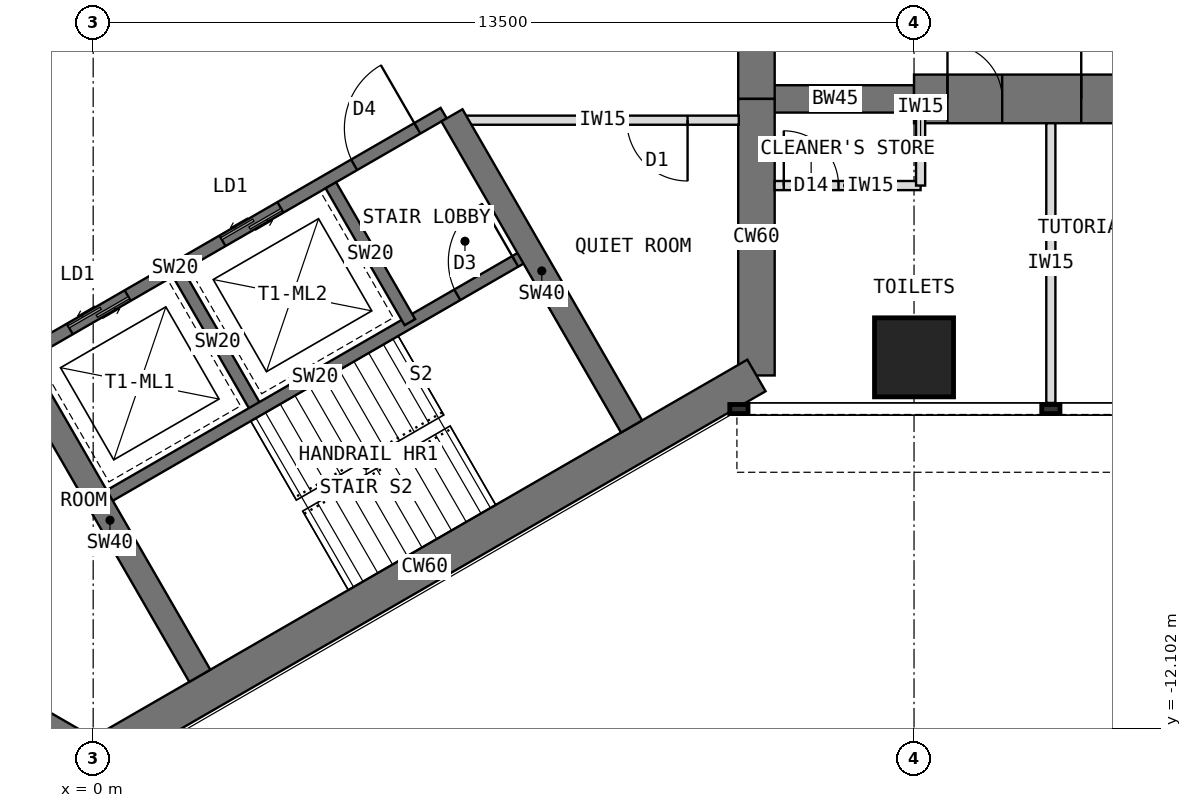
"""IFC4 building model, lengths in metres.
Left out: names, types, materials, properties, quantities, classifications, styles, units other than length and angle.
Written with IfcOpenShell. Run it as: python <this file> out.ifc"""

import sys

from ifc_helpers import new_model, si_unit, direction, frame, frame_2d, origin, origin_2d, place, context, subcontext, project, spatial, rectangle, extrude, element, fill, save


model = new_model("IFC4")
c1 = context("Model", 3, precision=1e-05, world=origin(), true_north=direction((0.0, 1.0)))
c2 = subcontext(c1, "Body", "Model", "MODEL_VIEW")
j1 = project(units=[si_unit("LENGTHUNIT", "METRE"), si_unit("PLANEANGLEUNIT", "RADIAN")], contexts=[c1])
p1 = place(None, origin())
s1 = spatial("IfcSite", under=j1, at=p1, CompositionType="ELEMENT")
p2 = place(p1, origin())
s2 = spatial("IfcBuilding", under=s1, at=p2, CompositionType="ELEMENT")
p3 = place(p2, frame((0.0, 0.0, 133.5)))
s3 = spatial("IfcBuildingStorey", under=s2, at=p3, CompositionType="ELEMENT", Elevation=133.5)
p4 = place(p3, frame((10.908, -6.298, 0.0), z_axis=(0.0, 0.0, 1.0), x_axis=(0.0, 1.0, 0.0)))
e1 = element("IfcWall", 1, at=p4, inside=s3, PredefinedType="SHEAR", context=c2, shape_type="SweptSolid", body=[
    extrude(rectangle(XDim=4.548, YDim=0.6, at=frame_2d((2.274, 0.0))), origin(), (0.0, 0.0, 1.0), 4.0),
])
p5 = place(p3, frame((10.908, -1.75, 0.0), z_axis=(0.0, 0.0, 1.0), x_axis=(0.0, 1.0, 0.0)))
e2 = element("IfcWall", 2, at=p5, inside=s3, PredefinedType="SHEAR", context=c2, shape_type="SweptSolid", body=[
    extrude(rectangle(XDim=3.5, YDim=0.6, at=frame_2d((1.75, 0.0))), origin(), (0.0, 0.0, 1.0), 4.0),
])
p6 = place(p5, frame((0.85, 0.0, 0.0)))
e3 = element("IfcOpeningElement", 3, at=p6, cuts=e2, PredefinedType="OPENING", context=c2, shape_type="SweptSolid", body=[
    extrude(rectangle(XDim=1.8, YDim=2.1, at=frame_2d((0.9, 1.05))), frame((0.0, 0.31, 0.0), z_axis=(0.0, -1.0, 0.0), x_axis=(1.0, 0.0, 0.0)), (0.0, 0.0, 1.0), 0.62),
])
p7 = place(p3, frame((-3.939, -10.322, 0.0), z_axis=(0.0, 0.0, 1.0), x_axis=(0.866011268655, -0.500024481964, 0.0)))
e4 = element("IfcWall", 4, at=p7, inside=s3, PredefinedType="SHEAR", context=c2, shape_type="SweptSolid", body=[
    extrude(rectangle(XDim=4.548, YDim=0.6, at=frame_2d((2.274, 0.0))), origin(), (0.0, 0.0, 1.0), 4.0),
])
p8 = place(p3, frame((0.0, -12.596, 0.0), z_axis=(0.0, 0.0, 1.0), x_axis=(0.866021940709, 0.500005998175, 0.0)))
e5 = element("IfcWall", 5, at=p8, inside=s3, PredefinedType="SHEAR", context=c2, shape_type="SweptSolid", body=[
    extrude(rectangle(XDim=12.596, YDim=0.6, at=frame_2d((6.298, 0.0))), origin(), (0.0, 0.0, 1.0), 4.0),
])
p9 = place(p3, frame((10.908, -1.75, 0.0), z_axis=(0.0, 0.0, 1.0), x_axis=(1.0, 0.0, 0.0)))
e6 = element("IfcWall", 6, at=p9, inside=s3, PredefinedType="SHEAR", context=c2, shape_type="SweptSolid", body=[
    extrude(rectangle(XDim=2.592, YDim=0.45, at=frame_2d((1.296, 0.0))), origin(), (0.0, 0.0, 1.0), 4.0),
])
p10 = place(p3, frame((13.5, -1.75, 0.0), z_axis=(0.0, 0.0, 1.0), x_axis=(1.0, 0.0, 0.0)))
e7 = element("IfcWall", 7, at=p10, inside=s3, PredefinedType="SHEAR", context=c2, shape_type="SweptSolid", body=[
    extrude(rectangle(XDim=13.2, YDim=0.8, at=frame_2d((6.6, 0.0))), origin(), (0.0, 0.0, 1.0), 4.0),
])
p11 = place(p10, frame((0.55, 0.0, 0.0)))
e8 = element("IfcOpeningElement", 8, at=p11, cuts=e7, PredefinedType="OPENING", context=c2, shape_type="SweptSolid", body=[
    extrude(rectangle(XDim=0.9, YDim=2.1, at=frame_2d((0.45, 1.05))), frame((0.0, 0.41, 0.0), z_axis=(0.0, -1.0, 0.0), x_axis=(1.0, 0.0, 0.0)), (0.0, 0.0, 1.0), 0.82),
])
p12 = place(p10, frame((2.75, 0.0, 0.0)))
e9 = element("IfcOpeningElement", 9, at=p12, cuts=e7, PredefinedType="OPENING", context=c2, shape_type="SweptSolid", body=[
    extrude(rectangle(XDim=1.0, YDim=2.1, at=frame_2d((0.5, 1.05))), frame((0.0, 0.41, 0.0), z_axis=(0.0, -1.0, 0.0), x_axis=(1.0, 0.0, 0.0)), (0.0, 0.0, 1.0), 0.82),
])
p13 = place(p10, frame((7.25, 0.0, 0.0)))
e10 = element("IfcOpeningElement", 10, at=p13, cuts=e7, PredefinedType="OPENING", context=c2, shape_type="SweptSolid", body=[
    extrude(rectangle(XDim=1.0, YDim=2.1, at=frame_2d((0.5, 1.05))), frame((0.0, 0.41, 0.0), z_axis=(0.0, -1.0, 0.0), x_axis=(1.0, 0.0, 0.0)), (0.0, 0.0, 1.0), 0.82),
])
p14 = place(p3, frame((13.5, -6.0, 0.0), z_axis=(0.0, 0.0, 1.0), x_axis=(1.0, 0.0, 0.0)))
e11 = element("IfcColumn", 11, at=p14, inside=s3, PredefinedType="COLUMN", context=c2, shape_type="SweptSolid", body=[
    extrude(rectangle(XDim=1.3, YDim=1.3, at=origin_2d()), origin(), (0.0, 0.0, 1.0), 4.0),
])
p15 = place(p3, frame((-1.164, -5.984, 0.0), z_axis=(0.0, 0.0, 1.0), x_axis=(0.866026010844, 0.49999894854, 0.0)))
e12 = element("IfcWall", 12, at=p15, inside=s3, PredefinedType="SHEAR", context=c2, shape_type="SweptSolid", body=[
    extrude(rectangle(XDim=8.0, YDim=0.2, at=frame_2d((4.0, 0.0))), origin(), (0.0, 0.0, 1.0), 4.0),
])
p16 = place(p15, frame((6.3, 0.0, 0.0)))
e13 = element("IfcOpeningElement", 13, at=p16, cuts=e12, PredefinedType="OPENING", context=c2, shape_type="SweptSolid", body=[
    extrude(rectangle(XDim=1.2, YDim=2.1, at=frame_2d((0.6, 1.05))), frame((0.0, 0.11, 0.0), z_axis=(0.0, -1.0, 0.0), x_axis=(1.0, 0.0, 0.0)), (0.0, 0.0, 1.0), 0.22),
])
p17 = place(p15, frame((0.9, 0.0, 0.0)))
e14 = element("IfcOpeningElement", 14, at=p17, cuts=e12, PredefinedType="OPENING", context=c2, shape_type="SweptSolid", body=[
    extrude(rectangle(XDim=1.1, YDim=2.2, at=frame_2d((0.55, 1.1))), frame((0.0, 0.11, 0.0), z_axis=(0.0, -1.0, 0.0), x_axis=(1.0, 0.0, 0.0)), (0.0, 0.0, 1.0), 0.22),
])
p18 = place(p15, frame((3.8, 0.0, 0.0)))
e15 = element("IfcOpeningElement", 15, at=p18, cuts=e12, PredefinedType="OPENING", context=c2, shape_type="SweptSolid", body=[
    extrude(rectangle(XDim=1.1, YDim=2.2, at=frame_2d((0.55, 1.1))), frame((0.0, 0.11, 0.0), z_axis=(0.0, -1.0, 0.0), x_axis=(1.0, 0.0, 0.0)), (0.0, 0.0, 1.0), 0.22),
])
p19 = place(p3, frame((1.397, -4.62, 0.0), z_axis=(0.0, 0.0, 1.0), x_axis=(0.499936506574, -0.866062058628, 0.0)))
e16 = element("IfcWall", 16, at=p19, inside=s3, PredefinedType="SHEAR", context=c2, shape_type="SweptSolid", body=[
    extrude(rectangle(XDim=2.6, YDim=0.2, at=frame_2d((1.3, 0.0))), origin(), (0.0, 0.0, 1.0), 4.0),
])
p20 = place(p3, frame((3.909, -3.17, 0.0), z_axis=(0.0, 0.0, 1.0), x_axis=(0.49997716683, -0.86603858612, 0.0)))
e17 = element("IfcWall", 17, at=p20, inside=s3, PredefinedType="SHEAR", context=c2, shape_type="SweptSolid", body=[
    extrude(rectangle(XDim=2.6, YDim=0.2, at=frame_2d((1.3, 0.0))), origin(), (0.0, 0.0, 1.0), 4.0),
])
p21 = place(p3, frame((0.186, -8.322, 0.0), z_axis=(0.0, 0.0, 1.0), x_axis=(0.866026010844, 0.49999894854, 0.0)))
e18 = element("IfcWall", 18, at=p21, inside=s3, PredefinedType="SHEAR", context=c2, shape_type="SweptSolid", body=[
    extrude(rectangle(XDim=8.0, YDim=0.2, at=frame_2d((4.0, 0.0))), origin(), (0.0, 0.0, 1.0), 4.0),
])
p22 = place(p21, frame((6.7, 0.0, 0.0)))
e19 = element("IfcOpeningElement", 19, at=p22, cuts=e18, PredefinedType="OPENING", context=c2, shape_type="SweptSolid", body=[
    extrude(rectangle(XDim=1.1, YDim=2.1, at=frame_2d((0.55, 1.05))), frame((0.0, 0.11, 0.0), z_axis=(0.0, -1.0, 0.0), x_axis=(1.0, 0.0, 0.0)), (0.0, 0.0, 1.0), 0.22),
])
p23 = place(p3, frame((5.901, -2.02, 0.0), z_axis=(0.0, 0.0, 1.0), x_axis=(0.500027676417, -0.866009424208, 0.0)))
e20 = element("IfcWall", 20, at=p23, inside=s3, PredefinedType="SHEAR", context=c2, shape_type="SweptSolid", body=[
    extrude(rectangle(XDim=5.908, YDim=0.4, at=frame_2d((2.954, 0.0))), origin(), (0.0, 0.0, 1.0), 4.0),
])
p24 = place(p3, frame((-1.201, -6.12, 0.0), z_axis=(0.0, 0.0, 1.0), x_axis=(0.49999668571, -0.866027317282, 0.0)))
e21 = element("IfcWall", 21, at=p24, inside=s3, PredefinedType="SHEAR", context=c2, shape_type="SweptSolid", body=[
    extrude(rectangle(XDim=5.908, YDim=0.4, at=frame_2d((2.954, 0.0))), origin(), (0.0, 0.0, 1.0), 4.0),
])
p25 = place(p3, frame((15.75, -2.15, 0.0), z_axis=(0.0, 0.0, 1.0), x_axis=(0.0, -1.0, 0.0)))
e22 = element("IfcWall", 22, at=p25, inside=s3, PredefinedType="PARTITIONING", context=c2, shape_type="SweptSolid", body=[
    extrude(rectangle(XDim=4.6, YDim=0.15, at=frame_2d((2.3, 0.0))), origin(), (0.0, 0.0, 1.0), 3.8),
])
p26 = place(p3, frame((11.208, -3.175, 0.0), z_axis=(0.0, 0.0, 1.0), x_axis=(1.0, 0.0, 0.0)))
e23 = element("IfcWall", 23, at=p26, inside=s3, PredefinedType="PARTITIONING", context=c2, shape_type="SweptSolid", body=[
    extrude(rectangle(XDim=2.4, YDim=0.15, at=frame_2d((1.2, 0.0))), origin(), (0.0, 0.0, 1.0), 3.8),
])
p27 = place(p26, frame((0.15, 0.0, 0.0)))
e24 = element("IfcOpeningElement", 24, at=p27, cuts=e23, PredefinedType="OPENING", context=c2, shape_type="SweptSolid", body=[
    extrude(rectangle(XDim=0.9, YDim=2.1, at=frame_2d((0.45, 1.05))), frame((0.0, 0.085, 0.0), z_axis=(0.0, -1.0, 0.0), x_axis=(1.0, 0.0, 0.0)), (0.0, 0.0, 1.0), 0.17),
])
p28 = place(p3, frame((13.608, -1.975, 0.0), z_axis=(0.0, 0.0, 1.0), x_axis=(0.0, -1.0, 0.0)))
e25 = element("IfcWall", 25, at=p28, inside=s3, PredefinedType="PARTITIONING", context=c2, shape_type="SweptSolid", body=[
    extrude(rectangle(XDim=1.2, YDim=0.15, at=frame_2d((0.6, 0.0))), origin(), (0.0, 0.0, 1.0), 3.8),
])
p29 = place(p3, frame((10.618, -2.1, 0.0), z_axis=(0.0, 0.0, 1.0), x_axis=(-1.0, 0.0, 0.0)))
e26 = element("IfcWall", 26, at=p29, inside=s3, PredefinedType="PARTITIONING", context=c2, shape_type="SweptSolid", body=[
    extrude(rectangle(XDim=4.476, YDim=0.15, at=frame_2d((2.238, 0.0))), origin(), (0.0, 0.0, 1.0), 3.8),
])
p30 = place(p29, frame((0.843, 0.0, 0.0)))
e27 = element("IfcOpeningElement", 27, at=p30, cuts=e26, PredefinedType="OPENING", context=c2, shape_type="SweptSolid", body=[
    extrude(rectangle(XDim=1.0, YDim=2.1, at=frame_2d((0.5, 1.05))), frame((0.0, 0.085, 0.0), z_axis=(0.0, -1.0, 0.0), x_axis=(1.0, 0.0, 0.0)), (0.0, 0.0, 1.0), 0.17),
])
p31 = place(p16, origin())
e28 = element("IfcDoor", 28, at=p31, inside=s3, OperationType="SINGLE_SWING_RIGHT", PredefinedType="DOOR", context=c2, shape_type="SweptSolid", body=[
    extrude(rectangle(XDim=1.2, YDim=2.1, at=frame_2d((0.6, 1.05))), frame((0.0, 0.025, 0.0), z_axis=(0.0, -1.0, 0.0), x_axis=(1.0, 0.0, 0.0)), (0.0, 0.0, 1.0), 0.05),
])
fill(e13, e28)
p32 = place(p17, origin())
e29 = element("IfcDoor", 29, at=p32, inside=s3, OperationType="DOUBLE_DOOR_SLIDING", PredefinedType="DOOR", context=c2, shape_type="SweptSolid", body=[
    extrude(rectangle(XDim=1.1, YDim=2.2, at=frame_2d((0.55, 1.1))), frame((0.0, 0.025, 0.0), z_axis=(0.0, -1.0, 0.0), x_axis=(1.0, 0.0, 0.0)), (0.0, 0.0, 1.0), 0.05),
])
fill(e14, e29)
p33 = place(p18, origin())
e30 = element("IfcDoor", 30, at=p33, inside=s3, OperationType="DOUBLE_DOOR_SLIDING", PredefinedType="DOOR", context=c2, shape_type="SweptSolid", body=[
    extrude(rectangle(XDim=1.1, YDim=2.2, at=frame_2d((0.55, 1.1))), frame((0.0, 0.025, 0.0), z_axis=(0.0, -1.0, 0.0), x_axis=(1.0, 0.0, 0.0)), (0.0, 0.0, 1.0), 0.05),
])
fill(e15, e30)
p34 = place(p22, origin())
e31 = element("IfcDoor", 31, at=p34, inside=s3, OperationType="SINGLE_SWING_RIGHT", PredefinedType="DOOR", context=c2, shape_type="SweptSolid", body=[
    extrude(rectangle(XDim=1.1, YDim=2.1, at=frame_2d((0.55, 1.05))), frame((0.0, 0.025, 0.0), z_axis=(0.0, -1.0, 0.0), x_axis=(1.0, 0.0, 0.0)), (0.0, 0.0, 1.0), 0.05),
])
fill(e19, e31)
p35 = place(p27, origin())
e32 = element("IfcDoor", 32, at=p35, inside=s3, OperationType="SINGLE_SWING_LEFT", PredefinedType="DOOR", context=c2, shape_type="SweptSolid", body=[
    extrude(rectangle(XDim=0.9, YDim=2.1, at=frame_2d((0.45, 1.05))), frame((0.0, 0.025, 0.0), z_axis=(0.0, -1.0, 0.0), x_axis=(1.0, 0.0, 0.0)), (0.0, 0.0, 1.0), 0.05),
])
fill(e24, e32)
p36 = place(p30, origin())
e33 = element("IfcDoor", 33, at=p36, inside=s3, OperationType="SINGLE_SWING_LEFT", PredefinedType="DOOR", context=c2, shape_type="SweptSolid", body=[
    extrude(rectangle(XDim=1.0, YDim=2.1, at=frame_2d((0.5, 1.05))), frame((0.0, 0.025, 0.0), z_axis=(0.0, -1.0, 0.0), x_axis=(1.0, 0.0, 0.0)), (0.0, 0.0, 1.0), 0.05),
])
fill(e27, e33)
p37 = place(p11, origin())
e34 = element("IfcDoor", 34, at=p37, inside=s3, OperationType="SINGLE_SWING_LEFT", PredefinedType="DOOR", context=c2, shape_type="SweptSolid", body=[
    extrude(rectangle(XDim=0.82, YDim=2.06, at=frame_2d((0.45, 1.03))), frame((0.0, 0.025, 0.0), z_axis=(0.0, -1.0, 0.0), x_axis=(1.0, 0.0, 0.0)), (0.0, 0.0, 1.0), 0.05),
    extrude(rectangle(XDim=0.04, YDim=2.1, at=frame_2d((0.02, 1.05))), frame((0.0, 0.4, 0.0), z_axis=(0.0, -1.0, 0.0), x_axis=(1.0, 0.0, 0.0)), (0.0, 0.0, 1.0), 0.8),
    extrude(rectangle(XDim=0.04, YDim=2.1, at=frame_2d((0.88, 1.05))), frame((0.0, 0.4, 0.0), z_axis=(0.0, -1.0, 0.0), x_axis=(1.0, 0.0, 0.0)), (0.0, 0.0, 1.0), 0.8),
    extrude(rectangle(XDim=0.82, YDim=0.04, at=frame_2d((0.45, 2.08))), frame((0.0, 0.4, 0.0), z_axis=(0.0, -1.0, 0.0), x_axis=(1.0, 0.0, 0.0)), (0.0, 0.0, 1.0), 0.8),
])
fill(e8, e34)
p38 = place(p12, origin())
e35 = element("IfcDoor", 35, at=p38, inside=s3, OperationType="SINGLE_SWING_LEFT", PredefinedType="DOOR", context=c2, shape_type="SweptSolid", body=[
    extrude(rectangle(XDim=0.92, YDim=2.06, at=frame_2d((0.5, 1.03))), frame((0.0, 0.025, 0.0), z_axis=(0.0, -1.0, 0.0), x_axis=(1.0, 0.0, 0.0)), (0.0, 0.0, 1.0), 0.05),
    extrude(rectangle(XDim=0.04, YDim=2.1, at=frame_2d((0.02, 1.05))), frame((0.0, 0.4, 0.0), z_axis=(0.0, -1.0, 0.0), x_axis=(1.0, 0.0, 0.0)), (0.0, 0.0, 1.0), 0.8),
    extrude(rectangle(XDim=0.04, YDim=2.1, at=frame_2d((0.98, 1.05))), frame((0.0, 0.4, 0.0), z_axis=(0.0, -1.0, 0.0), x_axis=(1.0, 0.0, 0.0)), (0.0, 0.0, 1.0), 0.8),
    extrude(rectangle(XDim=0.92, YDim=0.04, at=frame_2d((0.5, 2.08))), frame((0.0, 0.4, 0.0), z_axis=(0.0, -1.0, 0.0), x_axis=(1.0, 0.0, 0.0)), (0.0, 0.0, 1.0), 0.8),
])
fill(e9, e35)
save(model, sys.argv[1])
